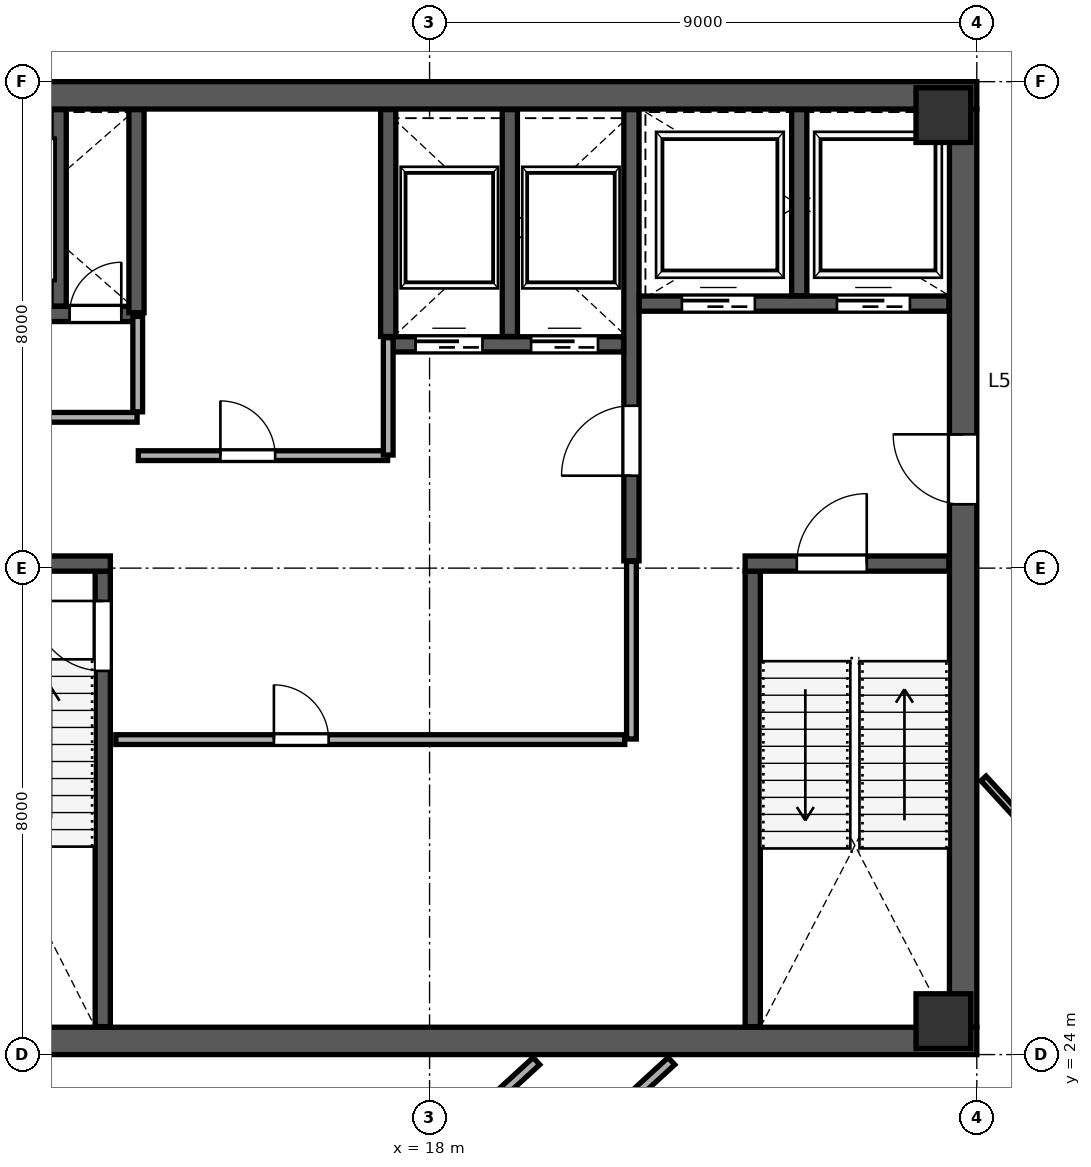
"""IFC4 building model, lengths in metres.
Left out: names, types, materials, properties, quantities, classifications, styles, units other than length and angle.
Written with IfcOpenShell. Run it as: python <this file> out.ifc"""

import sys

from ifc_helpers import new_model, si_unit, direction, frame, frame_2d, origin, origin_2d, place, context, subcontext, project, spatial, rectangle, extrude, source, transform, mapped, element, fill, save


model = new_model("IFC4")
c1 = context("Model", 3, precision=1e-05, world=origin(), true_north=direction((0.0, 1.0)))
c2 = subcontext(c1, "Body", "Model", "MODEL_VIEW")
j1 = project(units=[si_unit("LENGTHUNIT", "METRE"), si_unit("PLANEANGLEUNIT", "RADIAN")], contexts=[c1])
p1 = place(None, origin())
s1 = spatial("IfcSite", under=j1, at=p1, CompositionType="ELEMENT")
p2 = place(p1, origin())
s2 = spatial("IfcBuilding", under=s1, at=p2, CompositionType="ELEMENT")
p3 = place(p2, frame((0.0, 0.0, 262.6)))
s3 = spatial("IfcBuildingStorey", under=s2, at=p3, CompositionType="ELEMENT", Elevation=262.6)
m1 = source(origin(), c2, "Body", "SweptSolid", [
    extrude(rectangle(XDim=0.9, YDim=0.9, at=origin_2d()), origin(), (0.0, 0.0, 1.0), 4.198),
])
for number, where, z_axis, x_axis in (
    (1, (26.45, 24.55, 0.001), (0.0, 0.0, 1.0), (1.0, 0.0, 0.0)),
    (2, (26.45, 39.45, 0.001), (0.0, 0.0, 1.0), (1.0, 0.0, 0.0)),
):
    element("IfcColumn", number, at=place(p3, frame(where, z_axis=z_axis, x_axis=x_axis)), inside=s3, PredefinedType="COLUMN", context=c2, shape_type="MappedRepresentation", body=[
        mapped(m1, transform((0.0, 0.0, 0.0), scale=1.0)),
    ])
p4 = place(p3, frame((26.775, 24.45, 0.0), z_axis=(0.0, 0.0, 1.0), x_axis=(0.0, 1.0, 0.0)))
e3 = element("IfcWall", 3, at=p4, inside=s3, PredefinedType="SHEAR", context=c2, shape_type="SweptSolid", body=[
    extrude(rectangle(XDim=15.1, YDim=0.45, at=frame_2d((7.55, 0.0))), origin(), (0.0, 0.0, 1.0), 3.96),
])
p5 = place(p4, frame((8.6, 0.0, 0.0)))
e4 = element("IfcOpeningElement", 4, at=p5, cuts=e3, PredefinedType="OPENING", context=c2, shape_type="SweptSolid", body=[
    extrude(rectangle(XDim=1.15, YDim=2.2, at=frame_2d((0.575, 1.1))), frame((0.0, 0.235, 0.0), z_axis=(0.0, -1.0, 0.0), x_axis=(1.0, 0.0, 0.0)), (0.0, 0.0, 1.0), 0.47),
])
for number, where, z_axis, x_axis in (
    (5, (9.0, 24.225, 0.0), (0.0, 0.0, 1.0), (1.0, 0.0, 0.0)),
    (6, (9.0, 39.775, 0.0), (0.0, 0.0, 1.0), (1.0, 0.0, 0.0)),
):
    element("IfcWall", number, at=place(p3, frame(where, z_axis=z_axis, x_axis=x_axis)), inside=s3, PredefinedType="SHEAR", context=c2, shape_type="SweptSolid", body=[
        extrude(rectangle(XDim=18.0, YDim=0.45, at=frame_2d((9.0, 0.0))), origin(), (0.0, 0.0, 1.0), 3.96),
    ])
p6 = place(p3, frame((12.625, 24.46, 0.0), z_axis=(0.0, 0.0, 1.0), x_axis=(0.0, 1.0, 0.0)))
e7 = element("IfcWall", 7, at=p6, inside=s3, PredefinedType="SHEAR", context=c2, shape_type="SweptSolid", body=[
    extrude(rectangle(XDim=7.49, YDim=0.25, at=frame_2d((3.745, 0.0))), origin(), (0.0, 0.0, 1.0), 3.96),
])
p7 = place(p6, frame((5.85, 0.0, 0.0)))
e8 = element("IfcOpeningElement", 8, at=p7, cuts=e7, PredefinedType="OPENING", context=c2, shape_type="SweptSolid", body=[
    extrude(rectangle(XDim=1.15, YDim=2.2, at=frame_2d((0.575, 1.1))), frame((0.0, 0.135, 0.0), z_axis=(0.0, -1.0, 0.0), x_axis=(1.0, 0.0, 0.0)), (0.0, 0.0, 1.0), 0.27),
])
p8 = place(p3, frame((9.46, 32.075, 0.0), z_axis=(0.0, 0.0, 1.0), x_axis=(1.0, 0.0, 0.0)))
e9 = element("IfcWall", 9, at=p8, inside=s3, PredefinedType="SHEAR", context=c2, shape_type="SweptSolid", body=[
    extrude(rectangle(XDim=3.29, YDim=0.25, at=frame_2d((1.645, 0.0))), origin(), (0.0, 0.0, 1.0), 3.96),
])
p9 = place(p3, frame((23.315, 24.46, 0.0), z_axis=(0.0, 0.0, 1.0), x_axis=(0.0, 1.0, 0.0)))
e10 = element("IfcWall", 10, at=p9, inside=s3, PredefinedType="SHEAR", context=c2, shape_type="SweptSolid", body=[
    extrude(rectangle(XDim=7.49, YDim=0.25, at=frame_2d((3.745, 0.0))), origin(), (0.0, 0.0, 1.0), 3.96),
])
p10 = place(p3, frame((23.19, 32.075, 0.0), z_axis=(0.0, 0.0, 1.0), x_axis=(1.0, 0.0, 0.0)))
e11 = element("IfcWall", 11, at=p10, inside=s3, PredefinedType="SHEAR", context=c2, shape_type="SweptSolid", body=[
    extrude(rectangle(XDim=3.35, YDim=0.25, at=frame_2d((1.675, 0.0))), origin(), (0.0, 0.0, 1.0), 3.96),
])
p11 = place(p10, frame((0.85, 0.0, 0.0)))
e12 = element("IfcOpeningElement", 12, at=p11, cuts=e11, PredefinedType="OPENING", context=c2, shape_type="SweptSolid", body=[
    extrude(rectangle(XDim=1.15, YDim=2.2, at=frame_2d((0.575, 1.1))), frame((0.0, 0.135, 0.0), z_axis=(0.0, -1.0, 0.0), x_axis=(1.0, 0.0, 0.0)), (0.0, 0.0, 1.0), 0.27),
])
p12 = place(p3, frame((21.32, 32.12, 0.0), z_axis=(0.0, 0.0, 1.0), x_axis=(0.0, 1.0, 0.0)))
e13 = element("IfcWall", 13, at=p12, inside=s3, PredefinedType="SHEAR", context=c2, shape_type="SweptSolid", body=[
    extrude(rectangle(XDim=7.42, YDim=0.25, at=frame_2d((3.71, 0.0))), origin(), (0.0, 0.0, 1.0), 3.96),
])
p13 = place(p12, frame((1.4, 0.0, 0.0)))
e14 = element("IfcOpeningElement", 14, at=p13, cuts=e13, PredefinedType="OPENING", context=c2, shape_type="SweptSolid", body=[
    extrude(rectangle(XDim=1.15, YDim=2.2, at=frame_2d((0.575, 1.1))), frame((0.0, 0.135, 0.0), z_axis=(0.0, -1.0, 0.0), x_axis=(1.0, 0.0, 0.0)), (0.0, 0.0, 1.0), 0.27),
])
p14 = place(p3, frame((9.46, 36.18, 0.0), z_axis=(0.0, 0.0, 1.0), x_axis=(1.0, 0.0, 0.0)))
e15 = element("IfcWall", 15, at=p14, inside=s3, PredefinedType="SHEAR", context=c2, shape_type="SweptSolid", body=[
    extrude(rectangle(XDim=3.79, YDim=0.25, at=frame_2d((1.895, 0.0))), origin(), (0.0, 0.0, 1.0), 3.96),
])
p15 = place(p14, frame((2.62, 0.0, 0.0)))
e16 = element("IfcOpeningElement", 16, at=p15, cuts=e15, PredefinedType="OPENING", context=c2, shape_type="SweptSolid", body=[
    extrude(rectangle(XDim=0.85, YDim=2.1, at=frame_2d((0.425, 1.05))), frame((0.0, 0.135, 0.0), z_axis=(0.0, -1.0, 0.0), x_axis=(1.0, 0.0, 0.0)), (0.0, 0.0, 1.0), 0.27),
])
p16 = place(p14, frame((0.85, 0.0, 0.0)))
e17 = element("IfcOpeningElement", 17, at=p16, cuts=e15, PredefinedType="OPENING", context=c2, shape_type="SweptSolid", body=[
    extrude(rectangle(XDim=1.3, YDim=2.25, at=frame_2d((0.65, 1.125))), frame((0.0, 0.135, 0.0), z_axis=(0.0, -1.0, 0.0), x_axis=(1.0, 0.0, 0.0)), (0.0, 0.0, 1.0), 0.27),
])
p17 = place(p3, frame((11.9, 36.31, 0.0), z_axis=(0.0, 0.0, 1.0), x_axis=(0.0, 1.0, 0.0)))
e18 = element("IfcWall", 18, at=p17, inside=s3, PredefinedType="SHEAR", context=c2, shape_type="SweptSolid", body=[
    extrude(rectangle(XDim=3.23, YDim=0.25, at=frame_2d((1.615, 0.0))), origin(), (0.0, 0.0, 1.0), 3.96),
])
p18 = place(p3, frame((21.45, 36.35, 0.0), z_axis=(0.0, 0.0, 1.0), x_axis=(1.0, 0.0, 0.0)))
e19 = element("IfcWall", 19, at=p18, inside=s3, PredefinedType="SHEAR", context=c2, shape_type="SweptSolid", body=[
    extrude(rectangle(XDim=5.09, YDim=0.25, at=frame_2d((2.545, 0.0))), origin(), (0.0, 0.0, 1.0), 3.96),
])
p19 = place(p18, frame((0.7, 0.0, 0.0)))
e20 = element("IfcOpeningElement", 20, at=p19, cuts=e19, PredefinedType="OPENING", context=c2, shape_type="SweptSolid", body=[
    extrude(rectangle(XDim=1.2, YDim=2.2, at=frame_2d((0.6, 1.1))), frame((0.0, 0.135, 0.0), z_axis=(0.0, -1.0, 0.0), x_axis=(1.0, 0.0, 0.0)), (0.0, 0.0, 1.0), 0.27),
])
p20 = place(p18, frame((3.25, 0.0, 0.0)))
e21 = element("IfcOpeningElement", 21, at=p20, cuts=e19, PredefinedType="OPENING", context=c2, shape_type="SweptSolid", body=[
    extrude(rectangle(XDim=1.2, YDim=2.2, at=frame_2d((0.6, 1.1))), frame((0.0, 0.135, 0.0), z_axis=(0.0, -1.0, 0.0), x_axis=(1.0, 0.0, 0.0)), (0.0, 0.0, 1.0), 0.27),
])
p21 = place(p3, frame((24.08, 36.48, 0.0), z_axis=(0.0, 0.0, 1.0), x_axis=(0.0, 1.0, 0.0)))
e22 = element("IfcWall", 22, at=p21, inside=s3, PredefinedType="SHEAR", context=c2, shape_type="SweptSolid", body=[
    extrude(rectangle(XDim=3.06, YDim=0.25, at=frame_2d((1.53, 0.0))), origin(), (0.0, 0.0, 1.0), 3.96),
])
p22 = place(p3, frame((13.18, 36.2, 0.0), z_axis=(0.0, 0.0, 1.0), x_axis=(0.0, 1.0, 0.0)))
e23 = element("IfcWall", 23, at=p22, inside=s3, PredefinedType="SHEAR", context=c2, shape_type="SweptSolid", body=[
    extrude(rectangle(XDim=3.34, YDim=0.25, at=frame_2d((1.67, 0.0))), origin(), (0.0, 0.0, 1.0), 3.96),
])
p23 = place(p3, frame((17.32, 35.68, 0.0), z_axis=(0.0, 0.0, 1.0), x_axis=(1.0, 0.0, 0.0)))
e24 = element("IfcWall", 24, at=p23, inside=s3, PredefinedType="SHEAR", context=c2, shape_type="SweptSolid", body=[
    extrude(rectangle(XDim=3.87, YDim=0.25, at=frame_2d((1.935, 0.0))), origin(), (0.0, 0.0, 1.0), 3.96),
])
p24 = place(p23, frame((0.45, 0.0, 0.0)))
e25 = element("IfcOpeningElement", 25, at=p24, cuts=e24, PredefinedType="OPENING", context=c2, shape_type="SweptSolid", body=[
    extrude(rectangle(XDim=1.1, YDim=2.2, at=frame_2d((0.55, 1.1))), frame((0.0, 0.135, 0.0), z_axis=(0.0, -1.0, 0.0), x_axis=(1.0, 0.0, 0.0)), (0.0, 0.0, 1.0), 0.27),
])
p25 = place(p23, frame((2.35, 0.0, 0.0)))
e26 = element("IfcOpeningElement", 26, at=p25, cuts=e24, PredefinedType="OPENING", context=c2, shape_type="SweptSolid", body=[
    extrude(rectangle(XDim=1.1, YDim=2.2, at=frame_2d((0.55, 1.1))), frame((0.0, 0.135, 0.0), z_axis=(0.0, -1.0, 0.0), x_axis=(1.0, 0.0, 0.0)), (0.0, 0.0, 1.0), 0.27),
])
for number, where, z_axis, x_axis in (
    (27, (17.32, 35.81, 0.0), (0.0, 0.0, 1.0), (0.0, 1.0, 0.0)),
    (28, (19.32, 35.81, 0.0), (0.0, 0.0, 1.0), (0.0, 1.0, 0.0)),
):
    element("IfcWall", number, at=place(p3, frame(where, z_axis=z_axis, x_axis=x_axis)), inside=s3, PredefinedType="SHEAR", context=c2, shape_type="SweptSolid", body=[
        extrude(rectangle(XDim=3.73, YDim=0.25, at=frame_2d((1.865, 0.0))), origin(), (0.0, 0.0, 1.0), 3.96),
    ])
p26 = place(p3, frame((9.49, 34.48, 0.0), z_axis=(0.0, 0.0, 1.0), x_axis=(1.0, 0.0, 0.0)))
e29 = element("IfcWall", 29, at=p26, inside=s3, PredefinedType="PARTITIONING", context=c2, shape_type="SweptSolid", body=[
    extrude(rectangle(XDim=3.7, YDim=0.16, at=frame_2d((1.85, 0.0))), origin(), (0.0, 0.0, 1.0), 3.96),
])
p27 = place(p26, frame((1.15, 0.0, 0.0)))
e30 = element("IfcOpeningElement", 30, at=p27, cuts=e29, PredefinedType="OPENING", context=c2, shape_type="SweptSolid", body=[
    extrude(rectangle(XDim=0.9, YDim=2.15, at=frame_2d((0.45, 1.075))), frame((0.0, 0.09, 0.0), z_axis=(0.0, -1.0, 0.0), x_axis=(1.0, 0.0, 0.0)), (0.0, 0.0, 1.0), 0.18),
])
p28 = place(p3, frame((13.2, 34.57, 0.0), z_axis=(0.0, 0.0, 1.0), x_axis=(0.0, 1.0, 0.0)))
e31 = element("IfcWall", 31, at=p28, inside=s3, PredefinedType="PARTITIONING", context=c2, shape_type="SweptSolid", body=[
    extrude(rectangle(XDim=1.57, YDim=0.16, at=frame_2d((0.785, 0.0))), origin(), (0.0, 0.0, 1.0), 3.96),
])
p29 = place(p3, frame((13.21, 33.85, 0.0), z_axis=(0.0, 0.0, 1.0), x_axis=(1.0, 0.0, 0.0)))
e32 = element("IfcWall", 32, at=p29, inside=s3, PredefinedType="PARTITIONING", context=c2, shape_type="SweptSolid", body=[
    extrude(rectangle(XDim=4.1, YDim=0.16, at=frame_2d((2.05, 0.0))), origin(), (0.0, 0.0, 1.0), 3.96),
])
p30 = place(p29, frame((1.35, 0.0, 0.0)))
e33 = element("IfcOpeningElement", 33, at=p30, cuts=e32, PredefinedType="OPENING", context=c2, shape_type="SweptSolid", body=[
    extrude(rectangle(XDim=0.9, YDim=2.15, at=frame_2d((0.45, 1.075))), frame((0.0, 0.09, 0.0), z_axis=(0.0, -1.0, 0.0), x_axis=(1.0, 0.0, 0.0)), (0.0, 0.0, 1.0), 0.18),
])
p31 = place(p3, frame((17.32, 33.86, 0.0), z_axis=(0.0, 0.0, 1.0), x_axis=(0.0, 1.0, 0.0)))
e34 = element("IfcWall", 34, at=p31, inside=s3, PredefinedType="PARTITIONING", context=c2, shape_type="SweptSolid", body=[
    extrude(rectangle(XDim=1.93, YDim=0.16, at=frame_2d((0.965, 0.0))), origin(), (0.0, 0.0, 1.0), 3.96),
])
p32 = place(p3, frame((12.84, 29.18, 0.0), z_axis=(0.0, 0.0, 1.0), x_axis=(1.0, 0.0, 0.0)))
e35 = element("IfcWall", 35, at=p32, inside=s3, PredefinedType="PARTITIONING", context=c2, shape_type="SweptSolid", body=[
    extrude(rectangle(XDim=8.37, YDim=0.16, at=frame_2d((4.185, 0.0))), origin(), (0.0, 0.0, 1.0), 3.96),
])
p33 = place(p32, frame((2.6, 0.0, 0.0)))
e36 = element("IfcOpeningElement", 36, at=p33, cuts=e35, PredefinedType="OPENING", context=c2, shape_type="SweptSolid", body=[
    extrude(rectangle(XDim=0.9, YDim=2.15, at=frame_2d((0.45, 1.075))), frame((0.0, 0.09, 0.0), z_axis=(0.0, -1.0, 0.0), x_axis=(1.0, 0.0, 0.0)), (0.0, 0.0, 1.0), 0.18),
])
p34 = place(p3, frame((21.32, 29.19, 0.0), z_axis=(0.0, 0.0, 1.0), x_axis=(0.0, 1.0, 0.0)))
e37 = element("IfcWall", 37, at=p34, inside=s3, PredefinedType="PARTITIONING", context=c2, shape_type="SweptSolid", body=[
    extrude(rectangle(XDim=2.92, YDim=0.16, at=frame_2d((1.46, 0.0))), origin(), (0.0, 0.0, 1.0), 3.96),
])
p35 = place(p3, frame((4.203, 28.778, 0.0), z_axis=(0.0, 0.0, 1.0), x_axis=(0.675591041558, -0.737276572642, 0.0)))
e38 = element("IfcWall", 38, at=p35, inside=s3, PredefinedType="PARTITIONING", context=c2, shape_type="SweptSolid", body=[
    extrude(rectangle(XDim=14.07, YDim=0.16, at=frame_2d((7.035, 0.0))), origin(), (0.0, 0.0, 1.0), 3.96),
])
p36 = place(p35, frame((1.15, 0.0, 0.0)))
e39 = element("IfcOpeningElement", 39, at=p36, cuts=e38, PredefinedType="OPENING", context=c2, shape_type="SweptSolid", body=[
    extrude(rectangle(XDim=0.95, YDim=2.15, at=frame_2d((0.475, 1.075))), frame((0.0, 0.09, 0.0), z_axis=(0.0, -1.0, 0.0), x_axis=(1.0, 0.0, 0.0)), (0.0, 0.0, 1.0), 0.18),
])
p37 = place(p3, frame((13.765, 18.402, 0.0), z_axis=(0.0, 0.0, 1.0), x_axis=(0.737266340408, 0.675602207887, 0.0)))
e40 = element("IfcWall", 40, at=p37, inside=s3, PredefinedType="PARTITIONING", context=c2, shape_type="SweptSolid", body=[
    extrude(rectangle(XDim=8.128, YDim=0.16, at=frame_2d((4.064, 0.0))), origin(), (0.0, 0.0, 1.0), 3.96),
])
p38 = place(p3, frame((19.042, 50.92, 0.0), z_axis=(0.0, 0.0, 1.0), x_axis=(0.675589646996, -0.737277850523, 0.0)))
e41 = element("IfcWall", 41, at=p38, inside=s3, PredefinedType="PARTITIONING", context=c2, shape_type="SweptSolid", body=[
    extrude(rectangle(XDim=21.87, YDim=0.135, at=frame_2d((10.935, 0.0))), origin(), (0.0, 0.0, 1.0), 3.96),
])
p39 = place(p38, frame((5.4, 0.0, 0.0)))
e42 = element("IfcOpeningElement", 42, at=p39, cuts=e41, PredefinedType="OPENING", context=c2, shape_type="SweptSolid", body=[
    extrude(rectangle(XDim=0.95, YDim=2.15, at=frame_2d((0.475, 1.075))), frame((0.0, 0.078, 0.0), z_axis=(0.0, -1.0, 0.0), x_axis=(1.0, 0.0, 0.0)), (0.0, 0.0, 1.0), 0.155),
])
p40 = place(p38, frame((9.4, 0.0, 0.0)))
e43 = element("IfcOpeningElement", 43, at=p40, cuts=e41, PredefinedType="OPENING", context=c2, shape_type="SweptSolid", body=[
    extrude(rectangle(XDim=0.95, YDim=2.15, at=frame_2d((0.475, 1.075))), frame((0.0, 0.078, 0.0), z_axis=(0.0, -1.0, 0.0), x_axis=(1.0, 0.0, 0.0)), (0.0, 0.0, 1.0), 0.155),
])
p41 = place(p3, frame((1.393, 34.124, 0.0), z_axis=(0.0, 0.0, 1.0), x_axis=(0.737274323436, 0.675593496121, 0.0)))
e44 = element("IfcWall", 44, at=p41, inside=s3, PredefinedType="PARTITIONING", context=c2, shape_type="SweptSolid", body=[
    extrude(rectangle(XDim=27.402, YDim=0.135, at=frame_2d((13.701, 0.0))), origin(), (0.0, 0.0, 1.0), 3.96),
])
p42 = place(p3, frame((12.47, 15.181, 0.0), z_axis=(0.0, 0.0, 1.0), x_axis=(0.737265724175, 0.675602880365, 0.0)))
e45 = element("IfcWall", 45, at=p42, inside=s3, PredefinedType="PARTITIONING", context=c2, shape_type="SweptSolid", body=[
    extrude(rectangle(XDim=12.895, YDim=0.16, at=frame_2d((6.448, 0.0))), origin(), (0.0, 0.0, 1.0), 3.96),
])
p43 = place(p3, frame((27.11, 28.542, 0.0), z_axis=(0.0, 0.0, 1.0), x_axis=(0.675588589041, -0.737278819957, 0.0)))
e46 = element("IfcWall", 46, at=p43, inside=s3, PredefinedType="PARTITIONING", context=c2, shape_type="SweptSolid", body=[
    extrude(rectangle(XDim=17.88, YDim=0.115, at=frame_2d((8.94, 0.0))), origin(), (0.0, 0.0, 1.0), 3.96),
])
p44 = place(p43, frame((1.05, 0.0, 0.0)))
e47 = element("IfcOpeningElement", 47, at=p44, cuts=e46, PredefinedType="OPENING", context=c2, shape_type="SweptSolid", body=[
    extrude(rectangle(XDim=0.95, YDim=2.15, at=frame_2d((0.475, 1.075))), frame((0.0, 0.067, 0.0), z_axis=(0.0, -1.0, 0.0), x_axis=(1.0, 0.0, 0.0)), (0.0, 0.0, 1.0), 0.135),
])
m2 = source(origin(), c2, "Body", "SweptSolid", [
    extrude(rectangle(XDim=1.15, YDim=2.2, at=frame_2d((0.575, 1.1))), frame((0.0, 0.025, 0.0), z_axis=(0.0, -1.0, 0.0), x_axis=(1.0, 0.0, 0.0)), (0.0, 0.0, 1.0), 0.05),
])
p45 = place(p7, origin())
e48 = element("IfcDoor", 48, at=p45, inside=s3, OperationType="SINGLE_SWING_RIGHT", PredefinedType="DOOR", context=c2, shape_type="MappedRepresentation", body=[
    mapped(m2, transform((0.0, 0.0, 0.0), scale=1.0)),
])
fill(e8, e48)
m3 = source(origin(), c2, "Body", "SweptSolid", [
    extrude(rectangle(XDim=1.15, YDim=2.2, at=frame_2d((0.575, 1.1))), frame((0.0, 0.025, 0.0), z_axis=(0.0, -1.0, 0.0), x_axis=(1.0, 0.0, 0.0)), (0.0, 0.0, 1.0), 0.05),
])
p46 = place(p13, origin())
e49 = element("IfcDoor", 49, at=p46, inside=s3, OperationType="SINGLE_SWING_LEFT", PredefinedType="DOOR", context=c2, shape_type="MappedRepresentation", body=[
    mapped(m3, transform((0.0, 0.0, 0.0), scale=1.0)),
])
fill(e14, e49)
p47 = place(p11, origin())
e50 = element("IfcDoor", 50, at=p47, inside=s3, OperationType="SINGLE_SWING_RIGHT", PredefinedType="DOOR", context=c2, shape_type="MappedRepresentation", body=[
    mapped(m2, transform((0.0, 0.0, 0.0), scale=1.0)),
])
fill(e12, e50)
p48 = place(p5, origin())
e51 = element("IfcDoor", 51, at=p48, inside=s3, OperationType="SINGLE_SWING_RIGHT", PredefinedType="DOOR", context=c2, shape_type="MappedRepresentation", body=[
    mapped(m3, transform((0.0, 0.0, 0.0), scale=1.0)),
])
fill(e4, e51)
m4 = source(origin(), c2, "Body", "SweptSolid", [
    extrude(rectangle(XDim=0.85, YDim=2.1, at=frame_2d((0.425, 1.05))), frame((0.0, 0.025, 0.0), z_axis=(0.0, -1.0, 0.0), x_axis=(1.0, 0.0, 0.0)), (0.0, 0.0, 1.0), 0.05),
])
p49 = place(p15, origin())
e52 = element("IfcDoor", 52, at=p49, inside=s3, OperationType="SINGLE_SWING_RIGHT", PredefinedType="DOOR", context=c2, shape_type="MappedRepresentation", body=[
    mapped(m4, transform((0.0, 0.0, 0.0), scale=1.0)),
])
fill(e16, e52)
m5 = source(origin(), c2, "Body", "SweptSolid", [
    extrude(rectangle(XDim=1.1, YDim=2.2, at=frame_2d((0.55, 1.1))), frame((0.0, 0.025, 0.0), z_axis=(0.0, -1.0, 0.0), x_axis=(1.0, 0.0, 0.0)), (0.0, 0.0, 1.0), 0.05),
])
p50 = place(p24, origin())
e53 = element("IfcDoor", 53, at=p50, inside=s3, OperationType="SLIDING_TO_LEFT", PredefinedType="DOOR", context=c2, shape_type="MappedRepresentation", body=[
    mapped(m5, transform((0.0, 0.0, 0.0), scale=1.0)),
])
fill(e25, e53)
p51 = place(p25, origin())
e54 = element("IfcDoor", 54, at=p51, inside=s3, OperationType="SLIDING_TO_RIGHT", PredefinedType="DOOR", context=c2, shape_type="MappedRepresentation", body=[
    mapped(m5, transform((0.0, 0.0, 0.0), scale=1.0)),
])
fill(e26, e54)
m6 = source(origin(), c2, "Body", "SweptSolid", [
    extrude(rectangle(XDim=1.2, YDim=2.2, at=frame_2d((0.6, 1.1))), frame((0.0, 0.025, 0.0), z_axis=(0.0, -1.0, 0.0), x_axis=(1.0, 0.0, 0.0)), (0.0, 0.0, 1.0), 0.05),
])
p52 = place(p19, origin())
e55 = element("IfcDoor", 55, at=p52, inside=s3, OperationType="SLIDING_TO_LEFT", PredefinedType="DOOR", context=c2, shape_type="MappedRepresentation", body=[
    mapped(m6, transform((0.0, 0.0, 0.0), scale=1.0)),
])
fill(e20, e55)
p53 = place(p20, origin())
e56 = element("IfcDoor", 56, at=p53, inside=s3, OperationType="SLIDING_TO_RIGHT", PredefinedType="DOOR", context=c2, shape_type="MappedRepresentation", body=[
    mapped(m6, transform((0.0, 0.0, 0.0), scale=1.0)),
])
fill(e21, e56)
m7 = source(origin(), c2, "Body", "SweptSolid", [
    extrude(rectangle(XDim=0.9, YDim=2.15, at=frame_2d((0.45, 1.075))), frame((0.0, 0.025, 0.0), z_axis=(0.0, -1.0, 0.0), x_axis=(1.0, 0.0, 0.0)), (0.0, 0.0, 1.0), 0.05),
])
p54 = place(p30, origin())
e57 = element("IfcDoor", 57, at=p54, inside=s3, OperationType="SINGLE_SWING_LEFT", PredefinedType="DOOR", context=c2, shape_type="MappedRepresentation", body=[
    mapped(m7, transform((0.0, 0.0, 0.0), scale=1.0)),
])
fill(e33, e57)
p55 = place(p33, origin())
e58 = element("IfcDoor", 58, at=p55, inside=s3, OperationType="SINGLE_SWING_LEFT", PredefinedType="DOOR", context=c2, shape_type="MappedRepresentation", body=[
    mapped(m7, transform((0.0, 0.0, 0.0), scale=1.0)),
])
fill(e36, e58)
save(model, sys.argv[1])
